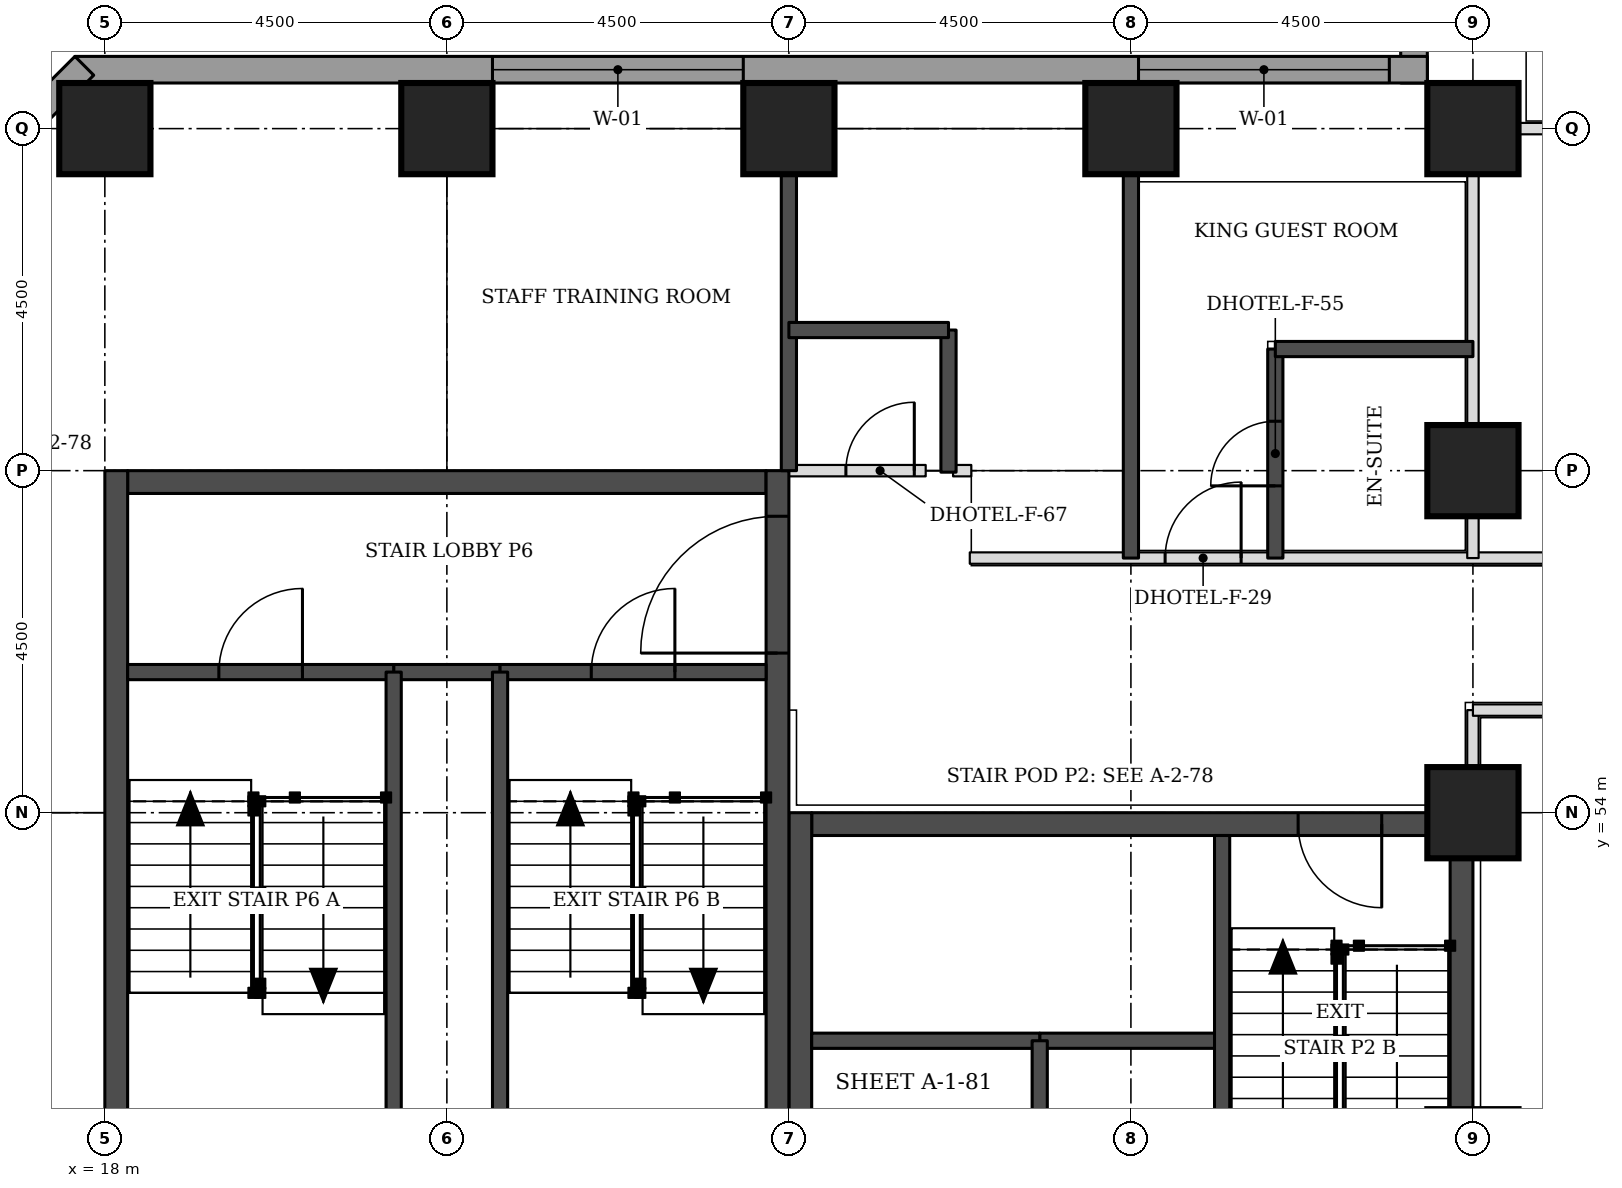
"""IFC4 building model, lengths in metres.
Left out: names, types, materials, properties, quantities, classifications, styles, units other than length and angle.
Written with IfcOpenShell. Run it as: python <this file> out.ifc"""

import sys

from ifc_helpers import new_model, si_unit, direction, frame, frame_2d, origin, origin_2d, place, context, subcontext, project, spatial, rectangle, extrude, element, fill, save


model = new_model("IFC4")
c1 = context("Model", 3, precision=1e-05, world=origin(), true_north=direction((0.0, 1.0)))
c2 = subcontext(c1, "Body", "Model", "MODEL_VIEW")
j1 = project(units=[si_unit("LENGTHUNIT", "METRE"), si_unit("PLANEANGLEUNIT", "RADIAN")], contexts=[c1])
p1 = place(None, origin())
s1 = spatial("IfcSite", under=j1, at=p1, CompositionType="ELEMENT")
p2 = place(p1, origin())
s2 = spatial("IfcBuilding", under=s1, at=p2, CompositionType="ELEMENT")
p3 = place(p2, frame((0.0, 0.0, 42.9)))
s3 = spatial("IfcBuildingStorey", under=s2, at=p3, CompositionType="ELEMENT", Elevation=42.9)
for number, where, z_axis, x_axis in (
    (1, (36.0, 54.0, 0.0), (0.0, 0.0, 1.0), (1.0, 0.0, 0.0)),
    (2, (36.0, 58.5, 0.0), (0.0, 0.0, 1.0), (1.0, 0.0, 0.0)),
    (3, (18.0, 63.0, 0.0), (0.0, 0.0, 1.0), (1.0, 0.0, 0.0)),
    (4, (22.5, 63.0, 0.0), (0.0, 0.0, 1.0), (1.0, 0.0, 0.0)),
    (5, (27.0, 63.0, 0.0), (0.0, 0.0, 1.0), (1.0, 0.0, 0.0)),
    (6, (31.5, 63.0, 0.0), (0.0, 0.0, 1.0), (1.0, 0.0, 0.0)),
    (7, (36.0, 63.0, 0.0), (0.0, 0.0, 1.0), (1.0, 0.0, 0.0)),
):
    element("IfcColumn", number, at=place(p3, frame(where, z_axis=z_axis, x_axis=x_axis)), inside=s3, PredefinedType="COLUMN", context=c2, shape_type="SweptSolid", body=[
        extrude(rectangle(XDim=1.2, YDim=1.2, at=origin_2d()), origin(), (0.0, 0.0, 1.0), 3.3),
    ])
p4 = place(p3, frame((27.3, 53.85, 0.0), z_axis=(0.0, 0.0, 1.0), x_axis=(1.0, 0.0, 0.0)))
e8 = element("IfcWall", 8, at=p4, inside=s3, PredefinedType="SHEAR", context=c2, shape_type="SweptSolid", body=[
    extrude(rectangle(XDim=8.4, YDim=0.3, at=frame_2d((4.2, 0.0))), origin(), (0.0, 0.0, 1.0), 3.3),
])
p5 = place(p4, frame((6.4, 0.0, 0.0)))
e9 = element("IfcOpeningElement", 9, at=p5, cuts=e8, PredefinedType="OPENING", context=c2, shape_type="SweptSolid", body=[
    extrude(rectangle(XDim=1.1, YDim=2.1, at=frame_2d((0.55, 1.05))), frame((0.0, 0.16, 0.0), z_axis=(0.0, -1.0, 0.0), x_axis=(1.0, 0.0, 0.0)), (0.0, 0.0, 1.0), 0.32),
])
p6 = place(p3, frame((27.15, 45.0, 0.0), z_axis=(0.0, 0.0, 1.0), x_axis=(0.0, 1.0, 0.0)))
e10 = element("IfcWall", 10, at=p6, inside=s3, PredefinedType="SHEAR", context=c2, shape_type="SweptSolid", body=[
    extrude(rectangle(XDim=9.0, YDim=0.3, at=frame_2d((4.5, 0.0))), origin(), (0.0, 0.0, 1.0), 3.3),
])
p7 = place(p6, frame((0.4, 0.0, 0.0)))
e11 = element("IfcOpeningElement", 11, at=p7, cuts=e10, PredefinedType="OPENING", context=c2, shape_type="SweptSolid", body=[
    extrude(rectangle(XDim=1.1, YDim=2.1, at=frame_2d((0.55, 1.05))), frame((0.0, 0.16, 0.0), z_axis=(0.0, -1.0, 0.0), x_axis=(1.0, 0.0, 0.0)), (0.0, 0.0, 1.0), 0.32),
])
p8 = place(p3, frame((35.85, 45.0, 0.0), z_axis=(0.0, 0.0, 1.0), x_axis=(0.0, 1.0, 0.0)))
e12 = element("IfcWall", 12, at=p8, inside=s3, PredefinedType="SHEAR", context=c2, shape_type="SweptSolid", body=[
    extrude(rectangle(XDim=9.0, YDim=0.3, at=frame_2d((4.5, 0.0))), origin(), (0.0, 0.0, 1.0), 3.3),
])
p9 = place(p3, frame((18.3, 58.35, 0.0), z_axis=(0.0, 0.0, 1.0), x_axis=(1.0, 0.0, 0.0)))
e13 = element("IfcWall", 13, at=p9, inside=s3, PredefinedType="SHEAR", context=c2, shape_type="SweptSolid", body=[
    extrude(rectangle(XDim=8.4, YDim=0.3, at=frame_2d((4.2, 0.0))), origin(), (0.0, 0.0, 1.0), 3.3),
])
p10 = place(p3, frame((18.15, 49.5, 0.0), z_axis=(0.0, 0.0, 1.0), x_axis=(0.0, 1.0, 0.0)))
e14 = element("IfcWall", 14, at=p10, inside=s3, PredefinedType="SHEAR", context=c2, shape_type="SweptSolid", body=[
    extrude(rectangle(XDim=9.0, YDim=0.3, at=frame_2d((4.5, 0.0))), origin(), (0.0, 0.0, 1.0), 3.3),
])
p11 = place(p3, frame((26.85, 49.5, 0.0), z_axis=(0.0, 0.0, 1.0), x_axis=(0.0, 1.0, 0.0)))
e15 = element("IfcWall", 15, at=p11, inside=s3, PredefinedType="SHEAR", context=c2, shape_type="SweptSolid", body=[
    extrude(rectangle(XDim=9.0, YDim=0.3, at=frame_2d((4.5, 0.0))), origin(), (0.0, 0.0, 1.0), 3.3),
])
p12 = place(p11, frame((6.6, 0.0, 0.0)))
e16 = element("IfcOpeningElement", 16, at=p12, cuts=e15, PredefinedType="OPENING", context=c2, shape_type="SweptSolid", body=[
    extrude(rectangle(XDim=1.8, YDim=2.1, at=frame_2d((0.9, 1.05))), frame((0.0, 0.16, 0.0), z_axis=(0.0, -1.0, 0.0), x_axis=(1.0, 0.0, 0.0)), (0.0, 0.0, 1.0), 0.32),
])
p13 = place(p3, frame((35.225, 76.894, 0.0), z_axis=(0.0, 0.0, 1.0), x_axis=(0.0, -1.0, 0.0)))
e17 = element("IfcWall", 17, at=p13, inside=s3, PredefinedType="STANDARD", context=c2, shape_type="SweptSolid", body=[
    extrude(rectangle(XDim=13.293, YDim=0.35, at=frame_2d((6.647, 0.0))), origin(), (0.0, 0.0, 1.0), 3.055),
])
p14 = place(p13, frame((9.493, 0.0, 0.8)))
e18 = element("IfcOpeningElement", 18, at=p14, cuts=e17, PredefinedType="OPENING", context=c2, shape_type="SweptSolid", body=[
    extrude(rectangle(XDim=3.3, YDim=1.5, at=frame_2d((1.65, 0.75))), frame((0.0, 0.185, 0.0), z_axis=(0.0, -1.0, 0.0), x_axis=(1.0, 0.0, 0.0)), (0.0, 0.0, 1.0), 0.37),
])
p15 = place(p3, frame((35.4, 63.775, 0.0), z_axis=(0.0, 0.0, 1.0), x_axis=(-1.0, 0.0, 0.0)))
e19 = element("IfcWall", 19, at=p15, inside=s3, PredefinedType="STANDARD", context=c2, shape_type="SweptSolid", body=[
    extrude(rectangle(XDim=17.793, YDim=0.35, at=frame_2d((8.897, 0.0))), origin(), (0.0, 0.0, 1.0), 3.055),
])
p16 = place(p15, frame((0.5, 0.0, 0.8)))
e20 = element("IfcOpeningElement", 20, at=p16, cuts=e19, PredefinedType="OPENING", context=c2, shape_type="SweptSolid", body=[
    extrude(rectangle(XDim=3.3, YDim=1.5, at=frame_2d((1.65, 0.75))), frame((0.0, 0.185, 0.0), z_axis=(0.0, -1.0, 0.0), x_axis=(1.0, 0.0, 0.0)), (0.0, 0.0, 1.0), 0.37),
])
p17 = place(p15, frame((9.0, 0.0, 0.8)))
e21 = element("IfcOpeningElement", 21, at=p17, cuts=e19, PredefinedType="OPENING", context=c2, shape_type="SweptSolid", body=[
    extrude(rectangle(XDim=3.3, YDim=1.5, at=frame_2d((1.65, 0.75))), frame((0.0, 0.185, 0.0), z_axis=(0.0, -1.0, 0.0), x_axis=(1.0, 0.0, 0.0)), (0.0, 0.0, 1.0), 0.37),
])
p18 = place(p3, frame((17.73, 63.826, 0.0), z_axis=(0.0, 0.0, 1.0), x_axis=(-0.707106781187, -0.707106781187, 0.0)))
e22 = element("IfcWall", 22, at=p18, inside=s3, PredefinedType="STANDARD", context=c2, shape_type="SweptSolid", body=[
    extrude(rectangle(XDim=7.151, YDim=0.35, at=frame_2d((3.576, 0.0))), origin(), (0.0, 0.0, 1.0), 3.055),
])
p19 = place(p18, frame((1.926, 0.0, 0.8)))
e23 = element("IfcOpeningElement", 23, at=p19, cuts=e22, PredefinedType="OPENING", context=c2, shape_type="SweptSolid", body=[
    extrude(rectangle(XDim=3.3, YDim=1.5, at=frame_2d((1.65, 0.75))), frame((0.0, 0.185, 0.0), z_axis=(0.0, -1.0, 0.0), x_axis=(1.0, 0.0, 0.0)), (0.0, 0.0, 1.0), 0.37),
])
p20 = place(p3, frame((36.0, 54.05, 0.0), z_axis=(0.0, 0.0, 1.0), x_axis=(0.0, 1.0, 0.0)))
e24 = element("IfcWall", 24, at=p20, inside=s3, PredefinedType="PARTITIONING", context=c2, shape_type="SweptSolid", body=[
    extrude(rectangle(XDim=1.3, YDim=0.15, at=frame_2d((0.65, 0.0))), origin(), (0.0, 0.0, 1.0), 2.33),
])
p21 = place(p3, frame((36.0, 55.35, 0.0), z_axis=(0.0, 0.0, 1.0), x_axis=(1.0, 0.0, 0.0)))
e25 = element("IfcWall", 25, at=p21, inside=s3, PredefinedType="PARTITIONING", context=c2, shape_type="SweptSolid", body=[
    extrude(rectangle(XDim=7.0, YDim=0.15, at=frame_2d((3.5, 0.0))), origin(), (0.0, 0.0, 1.0), 3.08),
])
p22 = place(p3, frame((29.38, 57.35, 0.0), z_axis=(0.0, 0.0, 1.0), x_axis=(1.0, 0.0, 0.0)))
e26 = element("IfcWall", 26, at=p22, inside=s3, PredefinedType="PARTITIONING", context=c2, shape_type="SweptSolid", body=[
    extrude(rectangle(XDim=13.62, YDim=0.15, at=frame_2d((6.81, 0.0))), origin(), (0.0, 0.0, 1.0), 3.08),
])
p23 = place(p22, frame((2.57, 0.0, 0.0)))
e27 = element("IfcOpeningElement", 27, at=p23, cuts=e26, PredefinedType="OPENING", context=c2, shape_type="SweptSolid", body=[
    extrude(rectangle(XDim=1.0, YDim=2.1, at=frame_2d((0.5, 1.05))), frame((0.0, 0.085, 0.0), z_axis=(0.0, -1.0, 0.0), x_axis=(1.0, 0.0, 0.0)), (0.0, 0.0, 1.0), 0.17),
])
p24 = place(p22, frame((8.42, 0.0, 0.0)))
e28 = element("IfcOpeningElement", 28, at=p24, cuts=e26, PredefinedType="OPENING", context=c2, shape_type="SweptSolid", body=[
    extrude(rectangle(XDim=0.9, YDim=2.1, at=frame_2d((0.45, 1.05))), frame((0.0, 0.085, 0.0), z_axis=(0.0, -1.0, 0.0), x_axis=(1.0, 0.0, 0.0)), (0.0, 0.0, 1.0), 0.17),
])
p25 = place(p3, frame((27.0, 58.5, 0.0), z_axis=(0.0, 0.0, 1.0), x_axis=(0.0, 1.0, 0.0)))
e29 = element("IfcWall", 29, at=p25, inside=s3, PredefinedType="SOLIDWALL", context=c2, shape_type="SweptSolid", body=[
    extrude(rectangle(XDim=3.9, YDim=0.2, at=frame_2d((1.95, 0.0))), origin(), (0.0, 0.0, 1.0), 3.08),
])
p26 = place(p3, frame((29.1, 58.48, 0.0), z_axis=(0.0, 0.0, 1.0), x_axis=(0.0, 1.0, 0.0)))
e30 = element("IfcWall", 30, at=p26, inside=s3, PredefinedType="SOLIDWALL", context=c2, shape_type="SweptSolid", body=[
    extrude(rectangle(XDim=1.87, YDim=0.2, at=frame_2d((0.935, 0.0))), origin(), (0.0, 0.0, 1.0), 3.08),
])
p27 = place(p3, frame((31.5, 57.35, 0.0), z_axis=(0.0, 0.0, 1.0), x_axis=(0.0, 1.0, 0.0)))
e31 = element("IfcWall", 31, at=p27, inside=s3, PredefinedType="SOLIDWALL", context=c2, shape_type="SweptSolid", body=[
    extrude(rectangle(XDim=5.05, YDim=0.2, at=frame_2d((2.525, 0.0))), origin(), (0.0, 0.0, 1.0), 3.08),
])
p28 = place(p3, frame((33.4, 57.35, 0.0), z_axis=(0.0, 0.0, 1.0), x_axis=(0.0, 1.0, 0.0)))
e32 = element("IfcWall", 32, at=p28, inside=s3, PredefinedType="SOLIDWALL", context=c2, shape_type="SweptSolid", body=[
    extrude(rectangle(XDim=2.75, YDim=0.2, at=frame_2d((1.375, 0.0))), origin(), (0.0, 0.0, 1.0), 3.08),
])
p29 = place(p28, frame((0.95, 0.0, 0.0)))
e33 = element("IfcOpeningElement", 33, at=p29, cuts=e32, PredefinedType="OPENING", context=c2, shape_type="SweptSolid", body=[
    extrude(rectangle(XDim=0.85, YDim=2.1, at=frame_2d((0.425, 1.05))), frame((0.0, 0.11, 0.0), z_axis=(0.0, -1.0, 0.0), x_axis=(1.0, 0.0, 0.0)), (0.0, 0.0, 1.0), 0.22),
])
p30 = place(p3, frame((33.4, 60.1, 0.0), z_axis=(0.0, 0.0, 1.0), x_axis=(1.0, 0.0, 0.0)))
e34 = element("IfcWall", 34, at=p30, inside=s3, PredefinedType="SOLIDWALL", context=c2, shape_type="SweptSolid", body=[
    extrude(rectangle(XDim=2.6, YDim=0.2, at=frame_2d((1.3, 0.0))), origin(), (0.0, 0.0, 1.0), 3.08),
])
p31 = place(p3, frame((27.0, 60.35, 0.0), z_axis=(0.0, 0.0, 1.0), x_axis=(1.0, 0.0, 0.0)))
e35 = element("IfcWall", 35, at=p31, inside=s3, PredefinedType="SOLIDWALL", context=c2, shape_type="SweptSolid", body=[
    extrude(rectangle(XDim=2.1, YDim=0.2, at=frame_2d((1.05, 0.0))), origin(), (0.0, 0.0, 1.0), 3.08),
])
p32 = place(p3, frame((36.0, 57.35, 0.0), z_axis=(0.0, 0.0, 1.0), x_axis=(0.0, 1.0, 0.0)))
e36 = element("IfcWall", 36, at=p32, inside=s3, PredefinedType="PARTITIONING", context=c2, shape_type="SweptSolid", body=[
    extrude(rectangle(XDim=5.05, YDim=0.15, at=frame_2d((2.525, 0.0))), origin(), (0.0, 0.0, 1.0), 2.33),
])
p33 = place(p3, frame((36.6, 63.0, 0.0), z_axis=(0.0, 0.0, 1.0), x_axis=(1.0, 0.0, 0.0)))
e37 = element("IfcWall", 37, at=p33, inside=s3, PredefinedType="PARTITIONING", context=c2, shape_type="SweptSolid", body=[
    extrude(rectangle(XDim=6.4, YDim=0.15, at=frame_2d((3.2, 0.0))), origin(), (0.0, 0.0, 1.0), 3.08),
])
p34 = place(p3, frame((27.0, 58.5, 0.0), z_axis=(0.0, 0.0, 1.0), x_axis=(1.0, 0.0, 0.0)))
e38 = element("IfcWall", 38, at=p34, inside=s3, PredefinedType="PARTITIONING", context=c2, shape_type="SweptSolid", body=[
    extrude(rectangle(XDim=1.8, YDim=0.15, at=frame_2d((0.9, 0.0))), origin(), (0.0, 0.0, 1.0), 3.08),
])
p35 = place(p34, frame((0.75, 0.0, 0.0)))
e39 = element("IfcOpeningElement", 39, at=p35, cuts=e38, PredefinedType="OPENING", context=c2, shape_type="SweptSolid", body=[
    extrude(rectangle(XDim=0.9, YDim=2.1, at=frame_2d((0.45, 1.05))), frame((0.0, 0.085, 0.0), z_axis=(0.0, -1.0, 0.0), x_axis=(1.0, 0.0, 0.0)), (0.0, 0.0, 1.0), 0.17),
])
p36 = place(p3, frame((29.16, 58.5, 0.0), z_axis=(0.0, 0.0, 1.0), x_axis=(1.0, 0.0, 0.0)))
e40 = element("IfcWall", 40, at=p36, inside=s3, PredefinedType="PARTITIONING", context=c2, shape_type="SweptSolid", body=[
    extrude(rectangle(XDim=0.24, YDim=0.15, at=frame_2d((0.12, 0.0))), origin(), (0.0, 0.0, 1.0), 3.08),
])
p37 = place(p3, frame((30.3, 51.0, 0.0), z_axis=(0.0, 0.0, 1.0), x_axis=(1.0, 0.0, 0.0)))
e41 = element("IfcWall", 41, at=p37, inside=s3, PredefinedType="SOLIDWALL", context=c2, shape_type="SweptSolid", body=[
    extrude(rectangle(XDim=2.4, YDim=0.2, at=frame_2d((1.2, 0.0))), origin(), (0.0, 0.0, 1.0), 3.3),
])
p38 = place(p3, frame((27.3, 51.0, 0.0), z_axis=(0.0, 0.0, 1.0), x_axis=(1.0, 0.0, 0.0)))
e42 = element("IfcWall", 42, at=p38, inside=s3, PredefinedType="SOLIDWALL", context=c2, shape_type="SweptSolid", body=[
    extrude(rectangle(XDim=3.0, YDim=0.2, at=frame_2d((1.5, 0.0))), origin(), (0.0, 0.0, 1.0), 3.08),
])
for number, where, z_axis, x_axis in (
    (43, (30.3, 45.3, 0.0), (0.0, 0.0, 1.0), (0.0, 1.0, 0.0)),
    (44, (32.7, 48.0, 0.0), (0.0, 0.0, 1.0), (0.0, 1.0, 0.0)),
):
    element("IfcWall", number, at=place(p3, frame(where, z_axis=z_axis, x_axis=x_axis)), inside=s3, PredefinedType="SOLIDWALL", context=c2, shape_type="SweptSolid", body=[
        extrude(rectangle(XDim=5.7, YDim=0.2, at=frame_2d((2.85, 0.0))), origin(), (0.0, 0.0, 1.0), 3.08),
    ])
p39 = place(p3, frame((21.8, 55.85, 0.0), z_axis=(0.0, 0.0, 1.0), x_axis=(1.0, 0.0, 0.0)))
e45 = element("IfcWall", 45, at=p39, inside=s3, PredefinedType="SOLIDWALL", context=c2, shape_type="SweptSolid", body=[
    extrude(rectangle(XDim=1.4, YDim=0.2, at=frame_2d((0.7, 0.0))), origin(), (0.0, 0.0, 1.0), 3.08),
])
p40 = place(p3, frame((18.3, 55.85, 0.0), z_axis=(0.0, 0.0, 1.0), x_axis=(1.0, 0.0, 0.0)))
e46 = element("IfcWall", 46, at=p40, inside=s3, PredefinedType="SOLIDWALL", context=c2, shape_type="SweptSolid", body=[
    extrude(rectangle(XDim=3.5, YDim=0.2, at=frame_2d((1.75, 0.0))), origin(), (0.0, 0.0, 1.0), 3.08),
])
p41 = place(p40, frame((1.2, 0.0, 0.0)))
e47 = element("IfcOpeningElement", 47, at=p41, cuts=e46, PredefinedType="OPENING", context=c2, shape_type="SweptSolid", body=[
    extrude(rectangle(XDim=1.1, YDim=2.1, at=frame_2d((0.55, 1.05))), frame((0.0, 0.11, 0.0), z_axis=(0.0, -1.0, 0.0), x_axis=(1.0, 0.0, 0.0)), (0.0, 0.0, 1.0), 0.22),
])
p42 = place(p3, frame((23.2, 55.85, 0.0), z_axis=(0.0, 0.0, 1.0), x_axis=(1.0, 0.0, 0.0)))
e48 = element("IfcWall", 48, at=p42, inside=s3, PredefinedType="SOLIDWALL", context=c2, shape_type="SweptSolid", body=[
    extrude(rectangle(XDim=3.5, YDim=0.2, at=frame_2d((1.75, 0.0))), origin(), (0.0, 0.0, 1.0), 3.08),
])
p43 = place(p42, frame((1.2, 0.0, 0.0)))
e49 = element("IfcOpeningElement", 49, at=p43, cuts=e48, PredefinedType="OPENING", context=c2, shape_type="SweptSolid", body=[
    extrude(rectangle(XDim=1.1, YDim=2.1, at=frame_2d((0.55, 1.05))), frame((0.0, 0.11, 0.0), z_axis=(0.0, -1.0, 0.0), x_axis=(1.0, 0.0, 0.0)), (0.0, 0.0, 1.0), 0.22),
])
for number, where, z_axis, x_axis in (
    (50, (21.8, 49.8, 0.0), (0.0, 0.0, 1.0), (0.0, 1.0, 0.0)),
    (51, (23.2, 49.8, 0.0), (0.0, 0.0, 1.0), (0.0, 1.0, 0.0)),
):
    element("IfcWall", number, at=place(p3, frame(where, z_axis=z_axis, x_axis=x_axis)), inside=s3, PredefinedType="SOLIDWALL", context=c2, shape_type="SweptSolid", body=[
        extrude(rectangle(XDim=6.05, YDim=0.2, at=frame_2d((3.025, 0.0))), origin(), (0.0, 0.0, 1.0), 3.08),
    ])
p44 = place(p16, origin())
e52 = element("IfcWindow", 52, at=p44, inside=s3, PartitioningType="SINGLE_PANEL", PredefinedType="WINDOW", context=c2, shape_type="SweptSolid", body=[
    extrude(rectangle(XDim=3.3, YDim=1.5, at=frame_2d((1.65, 0.75))), frame((0.0, 0.085, 0.0), z_axis=(0.0, -1.0, 0.0), x_axis=(1.0, 0.0, 0.0)), (0.0, 0.0, 1.0), 0.06),
])
fill(e20, e52)
p45 = place(p17, origin())
e53 = element("IfcWindow", 53, at=p45, inside=s3, PartitioningType="SINGLE_PANEL", PredefinedType="WINDOW", context=c2, shape_type="SweptSolid", body=[
    extrude(rectangle(XDim=3.3, YDim=1.5, at=frame_2d((1.65, 0.75))), frame((0.0, 0.085, 0.0), z_axis=(0.0, -1.0, 0.0), x_axis=(1.0, 0.0, 0.0)), (0.0, 0.0, 1.0), 0.06),
])
fill(e21, e53)
p46 = place(p23, origin())
e54 = element("IfcDoor", 54, at=p46, inside=s3, OperationType="SINGLE_SWING_RIGHT", PredefinedType="DOOR", context=c2, shape_type="SweptSolid", body=[
    extrude(rectangle(XDim=1.0, YDim=2.1, at=frame_2d((0.5, 1.05))), frame((0.0, 0.025, 0.0), z_axis=(0.0, -1.0, 0.0), x_axis=(1.0, 0.0, 0.0)), (0.0, 0.0, 1.0), 0.05),
])
fill(e27, e54)
p47 = place(p29, origin())
e55 = element("IfcDoor", 55, at=p47, inside=s3, OperationType="SINGLE_SWING_LEFT", PredefinedType="DOOR", context=c2, shape_type="SweptSolid", body=[
    extrude(rectangle(XDim=0.85, YDim=2.1, at=frame_2d((0.425, 1.05))), frame((0.0, 0.025, 0.0), z_axis=(0.0, -1.0, 0.0), x_axis=(1.0, 0.0, 0.0)), (0.0, 0.0, 1.0), 0.05),
])
fill(e33, e55)
p48 = place(p35, origin())
e56 = element("IfcDoor", 56, at=p48, inside=s3, OperationType="SINGLE_SWING_RIGHT", PredefinedType="DOOR", context=c2, shape_type="SweptSolid", body=[
    extrude(rectangle(XDim=0.9, YDim=2.1, at=frame_2d((0.45, 1.05))), frame((0.0, 0.025, 0.0), z_axis=(0.0, -1.0, 0.0), x_axis=(1.0, 0.0, 0.0)), (0.0, 0.0, 1.0), 0.05),
])
fill(e39, e56)
p49 = place(p5, frame((1.1, 0.0, 0.0), z_axis=(0.0, 0.0, 1.0), x_axis=(-1.0, 0.0, 0.0)))
e57 = element("IfcDoor", 57, at=p49, inside=s3, OperationType="SINGLE_SWING_LEFT", PredefinedType="DOOR", context=c2, shape_type="SweptSolid", body=[
    extrude(rectangle(XDim=1.1, YDim=2.1, at=frame_2d((0.55, 1.05))), frame((0.0, 0.025, 0.0), z_axis=(0.0, -1.0, 0.0), x_axis=(1.0, 0.0, 0.0)), (0.0, 0.0, 1.0), 0.05),
])
fill(e9, e57)
p50 = place(p41, origin())
e58 = element("IfcDoor", 58, at=p50, inside=s3, OperationType="SINGLE_SWING_RIGHT", PredefinedType="DOOR", context=c2, shape_type="SweptSolid", body=[
    extrude(rectangle(XDim=1.1, YDim=2.1, at=frame_2d((0.55, 1.05))), frame((0.0, 0.025, 0.0), z_axis=(0.0, -1.0, 0.0), x_axis=(1.0, 0.0, 0.0)), (0.0, 0.0, 1.0), 0.05),
])
fill(e47, e58)
p51 = place(p43, origin())
e59 = element("IfcDoor", 59, at=p51, inside=s3, OperationType="SINGLE_SWING_RIGHT", PredefinedType="DOOR", context=c2, shape_type="SweptSolid", body=[
    extrude(rectangle(XDim=1.1, YDim=2.1, at=frame_2d((0.55, 1.05))), frame((0.0, 0.025, 0.0), z_axis=(0.0, -1.0, 0.0), x_axis=(1.0, 0.0, 0.0)), (0.0, 0.0, 1.0), 0.05),
])
fill(e49, e59)
p52 = place(p12, origin())
e60 = element("IfcDoor", 60, at=p52, inside=s3, OperationType="SINGLE_SWING_LEFT", PredefinedType="DOOR", context=c2, shape_type="SweptSolid", body=[
    extrude(rectangle(XDim=1.8, YDim=2.1, at=frame_2d((0.9, 1.05))), frame((0.0, 0.025, 0.0), z_axis=(0.0, -1.0, 0.0), x_axis=(1.0, 0.0, 0.0)), (0.0, 0.0, 1.0), 0.05),
])
fill(e16, e60)
save(model, sys.argv[1])
